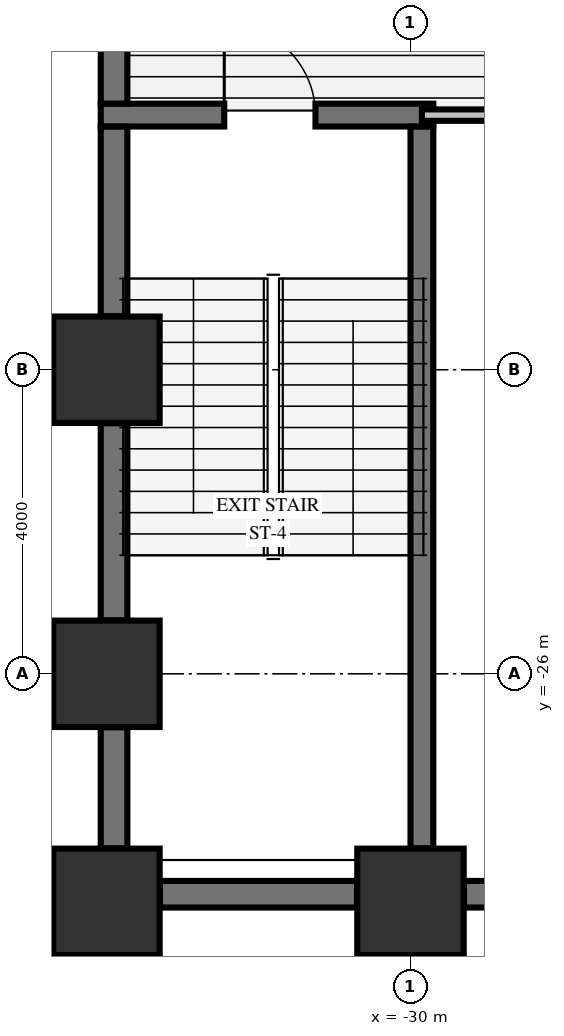
"""IFC4 building model, lengths in metres.
Left out: names, types, materials, properties, quantities, classifications, styles, units other than length and angle.
Written with IfcOpenShell. Run it as: python <this file> out.ifc"""

import sys

from ifc_helpers import new_model, si_unit, direction, frame, frame_2d, origin, origin_2d, place, context, subcontext, project, spatial, rectangle, extrude, element, fill, save


model = new_model("IFC4")
c1 = context("Model", 3, precision=1e-05, world=origin(), true_north=direction((0.0, 1.0)))
c2 = subcontext(c1, "Body", "Model", "MODEL_VIEW")
j1 = project(units=[si_unit("LENGTHUNIT", "METRE"), si_unit("PLANEANGLEUNIT", "RADIAN")], contexts=[c1])
p1 = place(None, origin())
s1 = spatial("IfcSite", under=j1, at=p1, CompositionType="ELEMENT")
p2 = place(p1, origin())
s2 = spatial("IfcBuilding", under=s1, at=p2, CompositionType="ELEMENT")
p3 = place(p2, frame((0.0, 0.0, -9.1)))
s3 = spatial("IfcBuildingStorey", under=s2, at=p3, CompositionType="ELEMENT", Elevation=-9.1)
for number, where, z_axis, x_axis in (
    (1, (-34.0, -29.0, -0.45), (0.0, 0.0, 1.0), (1.0, 0.0, 0.0)),
    (2, (-34.0, -26.0, -0.45), (0.0, 0.0, 1.0), (1.0, 0.0, 0.0)),
    (3, (-34.0, -22.0, -0.45), (0.0, 0.0, 1.0), (1.0, 0.0, 0.0)),
    (4, (-30.0, -29.0, -0.45), (0.0, 0.0, 1.0), (1.0, 0.0, 0.0)),
):
    element("IfcColumn", number, at=place(p3, frame(where, z_axis=z_axis, x_axis=x_axis)), inside=s3, PredefinedType="COLUMN", context=c2, shape_type="SweptSolid", body=[
        extrude(rectangle(XDim=1.4, YDim=1.4, at=origin_2d()), origin(), (0.0, 0.0, 1.0), 4.65),
    ])
for number, where, z_axis, x_axis in (
    (5, (-33.296, -28.9, 0.0), (0.0, 0.0, 1.0), (1.0, 0.0, 0.0)),
    (6, (-29.296, -28.9, 0.0), (0.0, 0.0, 1.0), (1.0, 0.0, 0.0)),
):
    element("IfcWall", number, at=place(p3, frame(where, z_axis=z_axis, x_axis=x_axis)), inside=s3, PredefinedType="SHEAR", context=c2, shape_type="SweptSolid", body=[
        extrude(rectangle(XDim=2.592, YDim=0.35, at=frame_2d((1.296, 0.0))), origin(), (0.0, 0.0, 1.0), 4.2),
    ])
p4 = place(p3, frame((-34.075, -18.65, 0.0), z_axis=(0.0, 0.0, 1.0), x_axis=(1.0, 0.0, 0.0)))
e7 = element("IfcWall", 7, at=p4, inside=s3, PredefinedType="SHEAR", context=c2, shape_type="SweptSolid", body=[
    extrude(rectangle(XDim=4.375, YDim=0.3, at=frame_2d((2.188, 0.0))), origin(), (0.0, 0.0, 1.0), 4.2),
])
p5 = place(p4, frame((1.625, 0.0, 0.0)))
e8 = element("IfcOpeningElement", 8, at=p5, cuts=e7, PredefinedType="OPENING", context=c2, shape_type="SweptSolid", body=[
    extrude(rectangle(XDim=1.2, YDim=2.15, at=frame_2d((0.6, 1.075))), frame((0.0, 0.16, 0.0), z_axis=(0.0, -1.0, 0.0), x_axis=(1.0, 0.0, 0.0)), (0.0, 0.0, 1.0), 0.32),
])
p6 = place(p3, frame((-29.85, -18.65, 0.0), z_axis=(0.0, 0.0, 1.0), x_axis=(1.0, 0.0, 0.0)))
e9 = element("IfcWall", 9, at=p6, inside=s3, PredefinedType="PARTITIONING", context=c2, shape_type="SweptSolid", body=[
    extrude(rectangle(XDim=9.925, YDim=0.15, at=frame_2d((4.962, 0.0))), origin(), (0.0, 0.0, 1.0), 4.2),
])
p7 = place(p3, frame((-33.9, -28.296, 0.0), z_axis=(0.0, 0.0, 1.0), x_axis=(0.0, 1.0, 0.0)))
e10 = element("IfcWall", 10, at=p7, inside=s3, PredefinedType="SHEAR", context=c2, shape_type="SweptSolid", body=[
    extrude(rectangle(XDim=1.592, YDim=0.35, at=frame_2d((0.796, 0.0))), origin(), (0.0, 0.0, 1.0), 4.2),
])
p8 = place(p3, frame((-33.9, -25.296, 0.0), z_axis=(0.0, 0.0, 1.0), x_axis=(0.0, 1.0, 0.0)))
e11 = element("IfcWall", 11, at=p8, inside=s3, PredefinedType="SHEAR", context=c2, shape_type="SweptSolid", body=[
    extrude(rectangle(XDim=2.592, YDim=0.35, at=frame_2d((1.296, 0.0))), origin(), (0.0, 0.0, 1.0), 4.2),
])
p9 = place(p3, frame((-33.9, -21.296, 0.0), z_axis=(0.0, 0.0, 1.0), x_axis=(0.0, 1.0, 0.0)))
e12 = element("IfcWall", 12, at=p9, inside=s3, PredefinedType="SHEAR", context=c2, shape_type="SweptSolid", body=[
    extrude(rectangle(XDim=2.494, YDim=0.35, at=frame_2d((1.247, 0.0))), origin(), (0.0, 0.0, 1.0), 4.2),
])
p10 = place(p3, frame((-33.9, -18.498, 0.0), z_axis=(0.0, 0.0, 1.0), x_axis=(0.0, 1.0, 0.0)))
e13 = element("IfcWall", 13, at=p10, inside=s3, PredefinedType="SHEAR", context=c2, shape_type="SweptSolid", body=[
    extrude(rectangle(XDim=1.794, YDim=0.35, at=frame_2d((0.897, 0.0))), origin(), (0.0, 0.0, 1.0), 4.2),
])
p11 = place(p3, frame((-29.85, -28.296, 0.0), z_axis=(0.0, 0.0, 1.0), x_axis=(0.0, 1.0, 0.0)))
e14 = element("IfcWall", 14, at=p11, inside=s3, PredefinedType="SHEAR", context=c2, shape_type="SweptSolid", body=[
    extrude(rectangle(XDim=9.494, YDim=0.3, at=frame_2d((4.747, 0.0))), origin(), (0.0, 0.0, 1.0), 4.2),
])
p12 = place(p5, origin())
e15 = element("IfcDoor", 15, at=p12, inside=s3, OperationType="SINGLE_SWING_LEFT", PredefinedType="DOOR", context=c2, shape_type="SweptSolid", body=[
    extrude(rectangle(XDim=1.2, YDim=2.15, at=frame_2d((0.6, 1.075))), frame((0.0, 0.025, 0.0), z_axis=(0.0, -1.0, 0.0), x_axis=(1.0, 0.0, 0.0)), (0.0, 0.0, 1.0), 0.05),
])
fill(e8, e15)
save(model, sys.argv[1])
